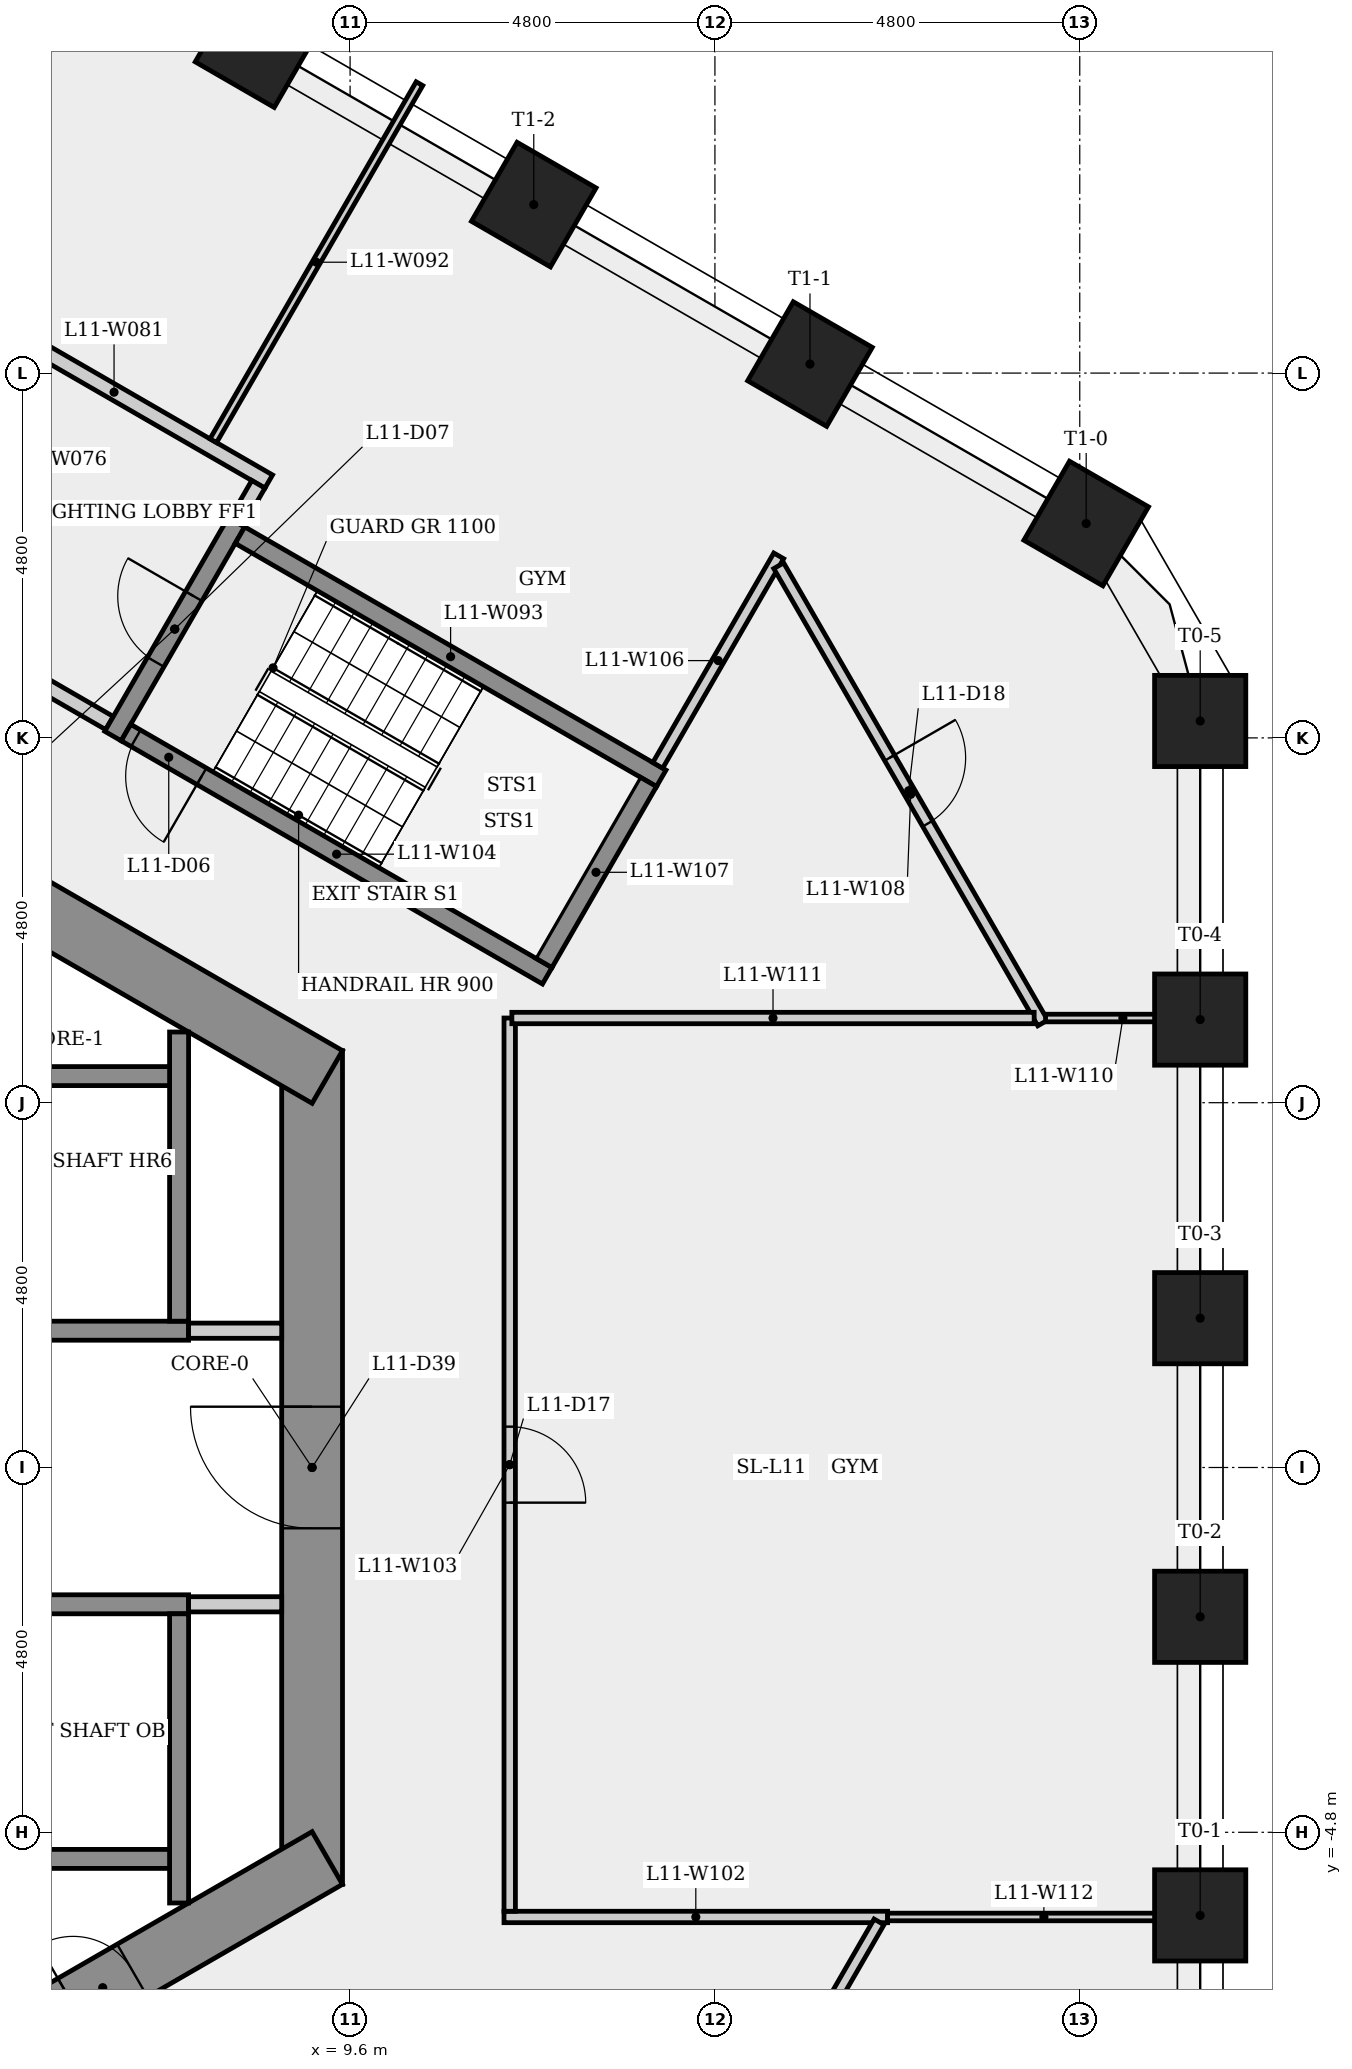
"""IFC4 building model, lengths in metres.
Left out: names, types, materials, properties, quantities, classifications, styles, units other than length and angle.
Written with IfcOpenShell. Run it as: python <this file> out.ifc"""

import sys

from ifc_helpers import new_model, si_unit, direction, frame, frame_2d, origin, origin_2d, place, context, subcontext, project, spatial, rectangle, extrude, element, fill, save


model = new_model("IFC4")
c1 = context("Model", 3, precision=1e-05, world=origin(), true_north=direction((0.0, 1.0)))
c2 = subcontext(c1, "Body", "Model", "MODEL_VIEW")
j1 = project(units=[si_unit("LENGTHUNIT", "METRE"), si_unit("PLANEANGLEUNIT", "RADIAN")], contexts=[c1])
p1 = place(None, origin())
s1 = spatial("IfcSite", under=j1, at=p1, CompositionType="ELEMENT")
p2 = place(p1, origin())
s2 = spatial("IfcBuilding", under=s1, at=p2, CompositionType="ELEMENT")
p3 = place(p2, frame((0.0, 0.0, 45.9)))
s3 = spatial("IfcBuildingStorey", under=s2, at=p3, CompositionType="ELEMENT", Elevation=45.9)
p4 = place(p3, frame((9.1, -5.485, 0.0), z_axis=(0.0, 0.0, 1.0), x_axis=(0.0, 1.0, 0.0)))
e1 = element("IfcWall", 1, at=p4, inside=s3, PredefinedType="SHEAR", context=c2, shape_type="SweptSolid", body=[
    extrude(rectangle(XDim=10.97, YDim=0.8, at=frame_2d((5.485, 0.0))), origin(), (0.0, 0.0, 1.0), 3.4),
])
p5 = place(p4, frame((4.685, 0.0, 0.0)))
e2 = element("IfcOpeningElement", 2, at=p5, cuts=e1, PredefinedType="OPENING", context=c2, shape_type="SweptSolid", body=[
    extrude(rectangle(XDim=1.6, YDim=2.1, at=frame_2d((0.8, 1.05))), frame((0.0, 0.41, 0.0), z_axis=(0.0, -1.0, 0.0), x_axis=(1.0, 0.0, 0.0)), (0.0, 0.0, 1.0), 0.82),
])
p6 = place(p3, frame((9.3, 5.138, 0.0), z_axis=(0.0, 0.0, 1.0), x_axis=(-0.866023993627, 0.500002442456, 0.0)))
e3 = element("IfcWall", 3, at=p6, inside=s3, PredefinedType="SHEAR", context=c2, shape_type="SweptSolid", body=[
    extrude(rectangle(XDim=10.97, YDim=0.8, at=frame_2d((5.485, 0.0))), origin(), (0.0, 0.0, 1.0), 3.4),
])
p7 = place(p6, frame((5.509, 0.0, 0.0)))
e4 = element("IfcOpeningElement", 4, at=p7, cuts=e3, PredefinedType="OPENING", context=c2, shape_type="SweptSolid", body=[
    extrude(rectangle(XDim=0.9, YDim=2.1, at=frame_2d((0.45, 1.05))), frame((0.0, 0.41, 0.0), z_axis=(0.0, -1.0, 0.0), x_axis=(1.0, 0.0, 0.0)), (0.0, 0.0, 1.0), 0.82),
])
p8 = place(p3, frame((-0.2, -10.623, 0.0), z_axis=(0.0, 0.0, 1.0), x_axis=(0.866023993627, 0.500002442456, 0.0)))
e5 = element("IfcWall", 5, at=p8, inside=s3, PredefinedType="SHEAR", context=c2, shape_type="SweptSolid", body=[
    extrude(rectangle(XDim=10.97, YDim=0.8, at=frame_2d((5.485, 0.0))), origin(), (0.0, 0.0, 1.0), 3.4),
])
p9 = place(p8, frame((7.108, 0.0, 0.0)))
e6 = element("IfcOpeningElement", 6, at=p9, cuts=e5, PredefinedType="OPENING", context=c2, shape_type="SweptSolid", body=[
    extrude(rectangle(XDim=0.9, YDim=2.1, at=frame_2d((0.45, 1.05))), frame((0.0, 0.41, 0.0), z_axis=(0.0, -1.0, 0.0), x_axis=(1.0, 0.0, 0.0)), (0.0, 0.0, 1.0), 0.82),
])
for number, where, z_axis, x_axis in (
    (7, (20.785, -5.894, 0.0), (0.0, 0.0, 1.0), (1.0, 0.0, 0.0)),
    (8, (20.785, -1.965, 0.0), (0.0, 0.0, 1.0), (1.0, 0.0, 0.0)),
    (9, (20.785, 1.965, 0.0), (0.0, 0.0, 1.0), (1.0, 0.0, 0.0)),
    (10, (20.785, 5.894, 0.0), (0.0, 0.0, 1.0), (1.0, 0.0, 0.0)),
    (11, (20.785, 9.823, 0.0), (0.0, 0.0, 1.0), (1.0, 0.0, 0.0)),
    (12, (19.285, 12.421, 0.0), (0.0, 0.0, 1.0), (0.5, 0.866, 0.0)),
    (13, (15.651, 14.519, 0.0), (0.0, 0.0, 1.0), (0.5, 0.866, 0.0)),
    (14, (12.016, 16.617, 0.0), (0.0, 0.0, 1.0), (0.5, 0.866, 0.0)),
    (15, (8.382, 18.715, 0.0), (0.0, 0.0, 1.0), (0.5, 0.866, 0.0)),
):
    element("IfcColumn", number, at=place(p3, frame(where, z_axis=z_axis, x_axis=x_axis)), inside=s3, PredefinedType="COLUMN", context=c2, shape_type="SweptSolid", body=[
        extrude(rectangle(XDim=1.2, YDim=1.2, at=origin_2d()), origin(), (0.0, 0.0, 1.0), 3.4),
    ])
p10 = place(p3, frame((-7.475, 1.8, 0.0), z_axis=(0.0, 0.0, 1.0), x_axis=(1.0, 0.0, 0.0)))
e16 = element("IfcWall", 16, at=p10, inside=s3, PredefinedType="SHEAR", context=c2, shape_type="SweptSolid", body=[
    extrude(rectangle(XDim=14.95, YDim=0.25, at=frame_2d((7.475, 0.0))), origin(), (0.0, 0.0, 1.0), 3.05),
])
for number, where, z_axis, x_axis in (
    (17, (-7.225, 5.15, 0.0), (0.0, 0.0, 1.0), (1.0, 0.0, 0.0)),
    (18, (-7.225, -5.15, 0.0), (0.0, 0.0, 1.0), (1.0, 0.0, 0.0)),
):
    element("IfcWall", number, at=place(p3, frame(where, z_axis=z_axis, x_axis=x_axis)), inside=s3, PredefinedType="SHEAR", context=c2, shape_type="SweptSolid", body=[
        extrude(rectangle(XDim=14.7, YDim=0.25, at=frame_2d((7.35, 0.0))), origin(), (0.0, 0.0, 1.0), 3.05),
    ])
p11 = place(p3, frame((-7.225, -1.8, 0.0), z_axis=(0.0, 0.0, 1.0), x_axis=(1.0, 0.0, 0.0)))
e19 = element("IfcWall", 19, at=p11, inside=s3, PredefinedType="SHEAR", context=c2, shape_type="SweptSolid", body=[
    extrude(rectangle(XDim=14.7, YDim=0.25, at=frame_2d((7.35, 0.0))), origin(), (0.0, 0.0, 1.0), 3.05),
])
p12 = place(p11, frame((0.597, 0.0, 0.0)))
e20 = element("IfcOpeningElement", 20, at=p12, cuts=e19, PredefinedType="OPENING", context=c2, shape_type="SweptSolid", body=[
    extrude(rectangle(XDim=1.1, YDim=2.1, at=frame_2d((0.55, 1.05))), frame((0.0, 0.135, 0.0), z_axis=(0.0, -1.0, 0.0), x_axis=(1.0, 0.0, 0.0)), (0.0, 0.0, 1.0), 0.27),
])
p13 = place(p11, frame((3.0, 0.0, 0.0)))
e21 = element("IfcOpeningElement", 21, at=p13, cuts=e19, PredefinedType="OPENING", context=c2, shape_type="SweptSolid", body=[
    extrude(rectangle(XDim=1.1, YDim=2.1, at=frame_2d((0.55, 1.05))), frame((0.0, 0.135, 0.0), z_axis=(0.0, -1.0, 0.0), x_axis=(1.0, 0.0, 0.0)), (0.0, 0.0, 1.0), 0.27),
])
p14 = place(p11, frame((5.45, 0.0, 0.0)))
e22 = element("IfcOpeningElement", 22, at=p14, cuts=e19, PredefinedType="OPENING", context=c2, shape_type="SweptSolid", body=[
    extrude(rectangle(XDim=1.1, YDim=2.1, at=frame_2d((0.55, 1.05))), frame((0.0, 0.135, 0.0), z_axis=(0.0, -1.0, 0.0), x_axis=(1.0, 0.0, 0.0)), (0.0, 0.0, 1.0), 0.27),
])
p15 = place(p11, frame((7.9, 0.0, 0.0)))
e23 = element("IfcOpeningElement", 23, at=p15, cuts=e19, PredefinedType="OPENING", context=c2, shape_type="SweptSolid", body=[
    extrude(rectangle(XDim=1.1, YDim=2.1, at=frame_2d((0.55, 1.05))), frame((0.0, 0.135, 0.0), z_axis=(0.0, -1.0, 0.0), x_axis=(1.0, 0.0, 0.0)), (0.0, 0.0, 1.0), 0.27),
])
p16 = place(p11, frame((10.35, 0.0, 0.0)))
e24 = element("IfcOpeningElement", 24, at=p16, cuts=e19, PredefinedType="OPENING", context=c2, shape_type="SweptSolid", body=[
    extrude(rectangle(XDim=1.1, YDim=2.1, at=frame_2d((0.55, 1.05))), frame((0.0, 0.135, 0.0), z_axis=(0.0, -1.0, 0.0), x_axis=(1.0, 0.0, 0.0)), (0.0, 0.0, 1.0), 0.27),
])
p17 = place(p3, frame((4.459, 15.323, 0.0), z_axis=(0.0, 0.0, 1.0), x_axis=(0.866016039709, -0.500016218704, 0.0)))
e25 = element("IfcWall", 25, at=p17, inside=s3, PredefinedType="PARTITIONING", context=c2, shape_type="SweptSolid", body=[
    extrude(rectangle(XDim=4.7, YDim=0.2, at=frame_2d((2.35, 0.0))), origin(), (0.0, 0.0, 1.0), 3.05),
])
p18 = place(p3, frame((6.435, 9.795, 0.0), z_axis=(0.0, 0.0, 1.0), x_axis=(-0.866012907634, 0.500021643343, 0.0)))
e26 = element("IfcWall", 26, at=p18, inside=s3, PredefinedType="PARTITIONING", context=c2, shape_type="SweptSolid", body=[
    extrude(rectangle(XDim=4.45, YDim=0.2, at=frame_2d((2.225, 0.0))), origin(), (0.0, 0.0, 1.0), 3.05),
])
p19 = place(p18, frame((1.675, 0.0, 0.0)))
e27 = element("IfcOpeningElement", 27, at=p19, cuts=e26, PredefinedType="OPENING", context=c2, shape_type="SweptSolid", body=[
    extrude(rectangle(XDim=1.1, YDim=2.1, at=frame_2d((0.55, 1.05))), frame((0.0, 0.11, 0.0), z_axis=(0.0, -1.0, 0.0), x_axis=(1.0, 0.0, 0.0)), (0.0, 0.0, 1.0), 0.22),
])
p20 = place(p3, frame((6.48, 9.624, 0.0), z_axis=(0.0, 0.0, 1.0), x_axis=(0.500017246033, 0.866015446554, 0.0)))
e28 = element("IfcWall", 28, at=p20, inside=s3, PredefinedType="SHEAR", context=c2, shape_type="SweptSolid", body=[
    extrude(rectangle(XDim=3.25, YDim=0.25, at=frame_2d((1.625, 0.0))), origin(), (0.0, 0.0, 1.0), 3.05),
])
p21 = place(p20, frame((1.125, 0.0, 0.0)))
e29 = element("IfcOpeningElement", 29, at=p21, cuts=e28, PredefinedType="OPENING", context=c2, shape_type="SweptSolid", body=[
    extrude(rectangle(XDim=1.0, YDim=2.1, at=frame_2d((0.5, 1.05))), frame((0.0, 0.135, 0.0), z_axis=(0.0, -1.0, 0.0), x_axis=(1.0, 0.0, 0.0)), (0.0, 0.0, 1.0), 0.27),
])
p22 = place(p3, frame((7.475, 1.8, 0.0), z_axis=(0.0, 0.0, 1.0), x_axis=(1.0, 0.0, 0.0)))
e30 = element("IfcWall", 30, at=p22, inside=s3, PredefinedType="PARTITIONING", context=c2, shape_type="SweptSolid", body=[
    extrude(rectangle(XDim=1.225, YDim=0.2, at=frame_2d((0.613, 0.0))), origin(), (0.0, 0.0, 1.0), 3.05),
])
for number, where, z_axis, x_axis in (
    (31, (7.35, -1.925, 0.0), (0.0, 0.0, 1.0), (0.0, -1.0, 0.0)),
    (32, (7.35, 5.73, 0.0), (0.0, 0.0, 1.0), (0.0, -1.0, 0.0)),
):
    element("IfcWall", number, at=place(p3, frame(where, z_axis=z_axis, x_axis=x_axis)), inside=s3, PredefinedType="SHEAR", context=c2, shape_type="SweptSolid", body=[
        extrude(rectangle(XDim=3.805, YDim=0.25, at=frame_2d((1.903, 0.0))), origin(), (0.0, 0.0, 1.0), 3.05),
    ])
p23 = place(p3, frame((7.8, 13.51, 0.0), z_axis=(0.0, 0.0, 1.0), x_axis=(0.499987379426, 0.866032690154, 0.0)))
e33 = element("IfcWall", 33, at=p23, inside=s3, PredefinedType="PARTITIONING", context=c2, shape_type="SweptSolid", body=[
    extrude(rectangle(XDim=5.425, YDim=0.1, at=frame_2d((2.712, 0.0))), origin(), (0.0, 0.0, 1.0), 3.05),
])
p24 = place(p3, frame((8.151, 12.268, 0.0), z_axis=(0.0, 0.0, 1.0), x_axis=(0.866025499775, -0.499999833739, 0.0)))
e34 = element("IfcWall", 34, at=p24, inside=s3, PredefinedType="SHEAR", context=c2, shape_type="SweptSolid", body=[
    extrude(rectangle(XDim=6.4, YDim=0.25, at=frame_2d((3.2, 0.0))), origin(), (0.0, 0.0, 1.0), 3.05),
])
p25 = place(p3, frame((8.393, 12.937, 0.0), z_axis=(0.0, 0.0, 1.0), x_axis=(-0.500065409566, -0.86598763626, 0.0)))
e35 = element("IfcWall", 35, at=p25, inside=s3, PredefinedType="PARTITIONING", context=c2, shape_type="SweptSolid", body=[
    extrude(rectangle(XDim=0.575, YDim=0.2, at=frame_2d((0.288, 0.0))), origin(), (0.0, 0.0, 1.0), 3.05),
])
p26 = place(p3, frame((8.7, -1.8, 0.0), z_axis=(0.0, 0.0, 1.0), x_axis=(-1.0, 0.0, 0.0)))
e36 = element("IfcWall", 36, at=p26, inside=s3, PredefinedType="PARTITIONING", context=c2, shape_type="SweptSolid", body=[
    extrude(rectangle(XDim=1.225, YDim=0.2, at=frame_2d((0.613, 0.0))), origin(), (0.0, 0.0, 1.0), 3.05),
])
p27 = place(p3, frame((11.625, -5.914, 0.0), z_axis=(0.0, 0.0, 1.0), x_axis=(1.0, 0.0, 0.0)))
e37 = element("IfcWall", 37, at=p27, inside=s3, PredefinedType="PARTITIONING", context=c2, shape_type="SweptSolid", body=[
    extrude(rectangle(XDim=5.047, YDim=0.15, at=frame_2d((2.523, 0.0))), origin(), (0.0, 0.0, 1.0), 3.05),
])
p28 = place(p3, frame((11.7, 5.914, 0.0), z_axis=(0.0, 0.0, 1.0), x_axis=(0.0, -1.0, 0.0)))
e38 = element("IfcWall", 38, at=p28, inside=s3, PredefinedType="PARTITIONING", context=c2, shape_type="SweptSolid", body=[
    extrude(rectangle(XDim=11.753, YDim=0.15, at=frame_2d((5.877, 0.0))), origin(), (0.0, 0.0, 1.0), 3.05),
])
p29 = place(p28, frame((5.377, 0.0, 0.0)))
e39 = element("IfcOpeningElement", 39, at=p29, cuts=e38, PredefinedType="OPENING", context=c2, shape_type="SweptSolid", body=[
    extrude(rectangle(XDim=1.0, YDim=2.1, at=frame_2d((0.5, 1.05))), frame((0.0, 0.085, 0.0), z_axis=(0.0, -1.0, 0.0), x_axis=(1.0, 0.0, 0.0)), (0.0, 0.0, 1.0), 0.17),
])
p30 = place(p3, frame((12.194, 6.47, 0.0), z_axis=(0.0, 0.0, 1.0), x_axis=(-0.866025499775, 0.499999833739, 0.0)))
e40 = element("IfcWall", 40, at=p30, inside=s3, PredefinedType="SHEAR", context=c2, shape_type="SweptSolid", body=[
    extrude(rectangle(XDim=6.4, YDim=0.25, at=frame_2d((3.2, 0.0))), origin(), (0.0, 0.0, 1.0), 3.05),
])
p31 = place(p30, frame((5.25, 0.0, 0.0)))
e41 = element("IfcOpeningElement", 41, at=p31, cuts=e40, PredefinedType="OPENING", context=c2, shape_type="SweptSolid", body=[
    extrude(rectangle(XDim=1.0, YDim=2.1, at=frame_2d((0.5, 1.05))), frame((0.0, 0.135, 0.0), z_axis=(0.0, -1.0, 0.0), x_axis=(1.0, 0.0, 0.0)), (0.0, 0.0, 1.0), 0.27),
])
p32 = place(p3, frame((13.648, 9.239, 0.0), z_axis=(0.0, 0.0, 1.0), x_axis=(0.5000079448, 0.866020816803, 0.0)))
e42 = element("IfcWall", 42, at=p32, inside=s3, PredefinedType="PARTITIONING", context=c2, shape_type="SweptSolid", body=[
    extrude(rectangle(XDim=3.183, YDim=0.15, at=frame_2d((1.592, 0.0))), origin(), (0.0, 0.0, 1.0), 3.05),
])
p33 = place(p3, frame((13.523, 9.022, 0.0), z_axis=(0.0, 0.0, 1.0), x_axis=(-0.500034990121, -0.866005201286, 0.0)))
e43 = element("IfcWall", 43, at=p33, inside=s3, PredefinedType="SHEAR", context=c2, shape_type="SweptSolid", body=[
    extrude(rectangle(XDim=2.75, YDim=0.25, at=frame_2d((1.375, 0.0))), origin(), (0.0, 0.0, 1.0), 3.05),
])
p34 = place(p3, frame((15.239, 11.865, 0.0), z_axis=(0.0, 0.0, 1.0), x_axis=(0.500009417749, -0.866019966376, 0.0)))
e44 = element("IfcWall", 44, at=p34, inside=s3, PredefinedType="PARTITIONING", context=c2, shape_type="SweptSolid", body=[
    extrude(rectangle(XDim=6.947, YDim=0.15, at=frame_2d((3.474, 0.0))), origin(), (0.0, 0.0, 1.0), 3.05),
])
p35 = place(p34, frame((2.919, 0.0, 0.0)))
e45 = element("IfcOpeningElement", 45, at=p35, cuts=e44, PredefinedType="OPENING", context=c2, shape_type="SweptSolid", body=[
    extrude(rectangle(XDim=1.0, YDim=2.1, at=frame_2d((0.5, 1.05))), frame((0.0, 0.085, 0.0), z_axis=(0.0, -1.0, 0.0), x_axis=(1.0, 0.0, 0.0)), (0.0, 0.0, 1.0), 0.17),
])
p36 = place(p3, frame((16.559, -5.979, 0.0), z_axis=(0.0, 0.0, 1.0), x_axis=(-0.499996220184, -0.866027586051, 0.0)))
e46 = element("IfcWall", 46, at=p36, inside=s3, PredefinedType="PARTITIONING", context=c2, shape_type="SweptSolid", body=[
    extrude(rectangle(XDim=8.183, YDim=0.15, at=frame_2d((4.091, 0.0))), origin(), (0.0, 0.0, 1.0), 3.05),
])
p37 = place(p36, frame((3.591, 0.0, 0.0)))
e47 = element("IfcOpeningElement", 47, at=p37, cuts=e46, PredefinedType="OPENING", context=c2, shape_type="SweptSolid", body=[
    extrude(rectangle(XDim=1.0, YDim=2.1, at=frame_2d((0.5, 1.05))), frame((0.0, 0.085, 0.0), z_axis=(0.0, -1.0, 0.0), x_axis=(1.0, 0.0, 0.0)), (0.0, 0.0, 1.0), 0.17),
])
p38 = place(p3, frame((18.75, 5.914, 0.0), z_axis=(0.0, 0.0, 1.0), x_axis=(1.0, 0.0, 0.0)))
e48 = element("IfcWall", 48, at=p38, inside=s3, PredefinedType="PARTITIONING", context=c2, shape_type="SweptSolid", body=[
    extrude(rectangle(XDim=2.034, YDim=0.1, at=frame_2d((1.017, 0.0))), origin(), (0.0, 0.0, 1.0), 3.05),
])
p39 = place(p3, frame((18.6, 5.914, 0.0), z_axis=(0.0, 0.0, 1.0), x_axis=(-1.0, 0.0, 0.0)))
e49 = element("IfcWall", 49, at=p39, inside=s3, PredefinedType="PARTITIONING", context=c2, shape_type="SweptSolid", body=[
    extrude(rectangle(XDim=6.872, YDim=0.15, at=frame_2d((3.436, 0.0))), origin(), (0.0, 0.0, 1.0), 3.05),
])
p40 = place(p3, frame((20.785, -5.914, 0.0), z_axis=(0.0, 0.0, 1.0), x_axis=(-1.0, 0.0, 0.0)))
e50 = element("IfcWall", 50, at=p40, inside=s3, PredefinedType="PARTITIONING", context=c2, shape_type="SweptSolid", body=[
    extrude(rectangle(XDim=4.113, YDim=0.1, at=frame_2d((2.057, 0.0))), origin(), (0.0, 0.0, 1.0), 3.05),
])
p41 = place(p31, origin())
e51 = element("IfcDoor", 51, at=p41, inside=s3, OperationType="SINGLE_SWING_LEFT", PredefinedType="DOOR", context=c2, shape_type="SweptSolid", body=[
    extrude(rectangle(XDim=1.0, YDim=2.1, at=frame_2d((0.5, 1.05))), frame((0.0, 0.025, 0.0), z_axis=(0.0, -1.0, 0.0), x_axis=(1.0, 0.0, 0.0)), (0.0, 0.0, 1.0), 0.05),
])
fill(e41, e51)
p42 = place(p21, origin())
e52 = element("IfcDoor", 52, at=p42, inside=s3, OperationType="SINGLE_SWING_RIGHT", PredefinedType="DOOR", context=c2, shape_type="SweptSolid", body=[
    extrude(rectangle(XDim=1.0, YDim=2.1, at=frame_2d((0.5, 1.05))), frame((0.0, 0.025, 0.0), z_axis=(0.0, -1.0, 0.0), x_axis=(1.0, 0.0, 0.0)), (0.0, 0.0, 1.0), 0.05),
])
fill(e29, e52)
p43 = place(p29, origin())
e53 = element("IfcDoor", 53, at=p43, inside=s3, OperationType="SINGLE_SWING_RIGHT", PredefinedType="DOOR", context=c2, shape_type="SweptSolid", body=[
    extrude(rectangle(XDim=1.0, YDim=2.1, at=frame_2d((0.5, 1.05))), frame((0.0, 0.025, 0.0), z_axis=(0.0, -1.0, 0.0), x_axis=(1.0, 0.0, 0.0)), (0.0, 0.0, 1.0), 0.05),
])
fill(e39, e53)
p44 = place(p35, origin())
e54 = element("IfcDoor", 54, at=p44, inside=s3, OperationType="SINGLE_SWING_LEFT", PredefinedType="DOOR", context=c2, shape_type="SweptSolid", body=[
    extrude(rectangle(XDim=1.0, YDim=2.1, at=frame_2d((0.5, 1.05))), frame((0.0, 0.025, 0.0), z_axis=(0.0, -1.0, 0.0), x_axis=(1.0, 0.0, 0.0)), (0.0, 0.0, 1.0), 0.05),
])
fill(e45, e54)
p45 = place(p9, origin())
e55 = element("IfcDoor", 55, at=p45, inside=s3, OperationType="SINGLE_SWING_LEFT", PredefinedType="DOOR", context=c2, shape_type="SweptSolid", body=[
    extrude(rectangle(XDim=0.9, YDim=2.1, at=frame_2d((0.45, 1.05))), frame((0.0, 0.025, 0.0), z_axis=(0.0, -1.0, 0.0), x_axis=(1.0, 0.0, 0.0)), (0.0, 0.0, 1.0), 0.05),
])
fill(e6, e55)
p46 = place(p5, origin())
e56 = element("IfcDoor", 56, at=p46, inside=s3, OperationType="SINGLE_SWING_RIGHT", PredefinedType="DOOR", context=c2, shape_type="SweptSolid", body=[
    extrude(rectangle(XDim=1.6, YDim=2.1, at=frame_2d((0.8, 1.05))), frame((0.0, 0.025, 0.0), z_axis=(0.0, -1.0, 0.0), x_axis=(1.0, 0.0, 0.0)), (0.0, 0.0, 1.0), 0.05),
])
fill(e2, e56)
save(model, sys.argv[1])
